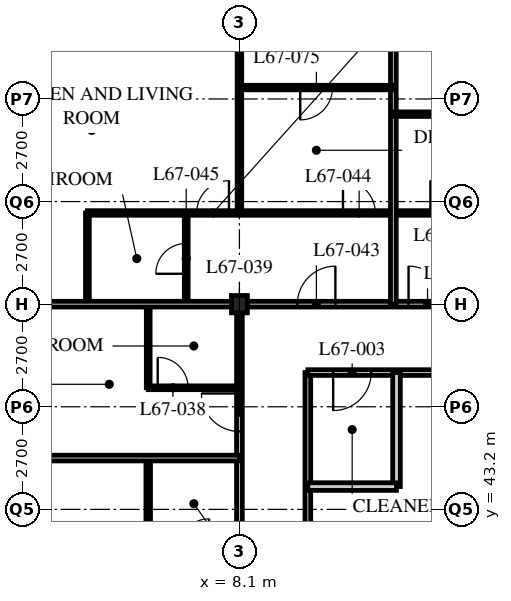
"""IFC4 building model, lengths in metres.
Left out: names, types, materials, properties, quantities, classifications, styles, units other than length and angle.
Written with IfcOpenShell. Run it as: python <this file> out.ifc"""

import sys

from ifc_helpers import new_model, si_unit, direction, frame, frame_2d, origin, origin_2d, place, context, subcontext, project, spatial, rectangle, i_section, extrude, element, fill, save


model = new_model("IFC4")
c1 = context("Model", 3, precision=1e-05, world=origin(), true_north=direction((0.0, 1.0)))
c2 = subcontext(c1, "Body", "Model", "MODEL_VIEW")
j1 = project(units=[si_unit("LENGTHUNIT", "METRE"), si_unit("PLANEANGLEUNIT", "RADIAN")], contexts=[c1])
p1 = place(None, origin())
s1 = spatial("IfcSite", under=j1, at=p1, CompositionType="ELEMENT")
p2 = place(p1, origin())
s2 = spatial("IfcBuilding", under=s1, at=p2, CompositionType="ELEMENT")
p3 = place(p2, frame((0.0, 0.0, 261.9)))
s3 = spatial("IfcBuildingStorey", under=s2, at=p3, CompositionType="ELEMENT", Elevation=261.9)
p4 = place(p3, frame((8.1, 48.6, 0.0), z_axis=(0.0, 0.0, 1.0), x_axis=(1.0, 0.0, 0.0)))
e1 = element("IfcColumn", 1, at=p4, inside=s3, PredefinedType="COLUMN", context=c2, shape_type="SweptSolid", body=[
    extrude(i_section(OverallWidth=0.418, OverallDepth=0.456, WebThickness=0.042, FlangeThickness=0.067, FilletRadius=0.015, at=origin_2d()), origin(), (0.0, 0.0, 1.0), 3.9),
])
p5 = place(p3, frame((8.1, 48.6, 0.0), z_axis=(0.0, 0.0, 1.0), x_axis=(1.0, 0.0, 0.0)))
e2 = element("IfcWall", 2, at=p5, inside=s3, PredefinedType="PARTITIONING", context=c2, shape_type="SweptSolid", body=[
    extrude(rectangle(XDim=28.35, YDim=0.15, at=frame_2d((14.175, 0.0))), origin(), (0.0, 0.0, 1.0), 3.078),
])
p6 = place(p5, frame((4.45, 0.0, 0.0)))
e3 = element("IfcOpeningElement", 3, at=p6, cuts=e2, PredefinedType="OPENING", context=c2, shape_type="SweptSolid", body=[
    extrude(rectangle(XDim=1.0, YDim=2.1, at=frame_2d((0.5, 1.05))), frame((0.0, 0.085, 0.0), z_axis=(0.0, -1.0, 0.0), x_axis=(1.0, 0.0, 0.0)), (0.0, 0.0, 1.0), 0.17),
])
p7 = place(p5, frame((20.65, 0.0, 0.0)))
e4 = element("IfcOpeningElement", 4, at=p7, cuts=e2, PredefinedType="OPENING", context=c2, shape_type="SweptSolid", body=[
    extrude(rectangle(XDim=1.0, YDim=2.1, at=frame_2d((0.5, 1.05))), frame((0.0, 0.085, 0.0), z_axis=(0.0, -1.0, 0.0), x_axis=(1.0, 0.0, 0.0)), (0.0, 0.0, 1.0), 0.17),
])
p8 = place(p5, frame((1.525, 0.0, 0.0)))
e5 = element("IfcOpeningElement", 5, at=p8, cuts=e2, PredefinedType="OPENING", context=c2, shape_type="SweptSolid", body=[
    extrude(rectangle(XDim=1.0, YDim=2.1, at=frame_2d((0.5, 1.05))), frame((0.0, 0.085, 0.0), z_axis=(0.0, -1.0, 0.0), x_axis=(1.0, 0.0, 0.0)), (0.0, 0.0, 1.0), 0.17),
])
p9 = place(p3, frame((8.1, 22.5, 0.0), z_axis=(0.0, 0.0, 1.0), x_axis=(0.0, 1.0, 0.0)))
e6 = element("IfcWall", 6, at=p9, inside=s3, PredefinedType="PARTITIONING", context=c2, shape_type="SweptSolid", body=[
    extrude(rectangle(XDim=26.1, YDim=0.15, at=frame_2d((13.05, 0.0))), origin(), (0.0, 0.0, 1.0), 3.078),
])
p10 = place(p9, frame((2.65, 0.0, 0.0)))
e7 = element("IfcOpeningElement", 7, at=p10, cuts=e6, PredefinedType="OPENING", context=c2, shape_type="SweptSolid", body=[
    extrude(rectangle(XDim=1.0, YDim=2.1, at=frame_2d((0.5, 1.05))), frame((0.0, 0.085, 0.0), z_axis=(0.0, -1.0, 0.0), x_axis=(1.0, 0.0, 0.0)), (0.0, 0.0, 1.0), 0.17),
])
p11 = place(p9, frame((22.75, 0.0, 0.0)))
e8 = element("IfcOpeningElement", 8, at=p11, cuts=e6, PredefinedType="OPENING", context=c2, shape_type="SweptSolid", body=[
    extrude(rectangle(XDim=1.0, YDim=2.1, at=frame_2d((0.5, 1.05))), frame((0.0, 0.085, 0.0), z_axis=(0.0, -1.0, 0.0), x_axis=(1.0, 0.0, 0.0)), (0.0, 0.0, 1.0), 0.17),
])
p12 = place(p3, frame((9.9, 24.3, 0.0), z_axis=(0.0, 0.0, 1.0), x_axis=(0.0, 1.0, 0.0)))
e9 = element("IfcWall", 9, at=p12, inside=s3, PredefinedType="PARTITIONING", context=c2, shape_type="SweptSolid", body=[
    extrude(rectangle(XDim=22.5, YDim=0.15, at=frame_2d((11.25, 0.0))), origin(), (0.0, 0.0, 1.0), 3.69),
])
p13 = place(p12, frame((3.55, 0.0, 0.0)))
e10 = element("IfcOpeningElement", 10, at=p13, cuts=e9, PredefinedType="OPENING", context=c2, shape_type="SweptSolid", body=[
    extrude(rectangle(XDim=1.0, YDim=2.1, at=frame_2d((0.5, 1.05))), frame((0.0, 0.085, 0.0), z_axis=(0.0, -1.0, 0.0), x_axis=(1.0, 0.0, 0.0)), (0.0, 0.0, 1.0), 0.17),
])
p14 = place(p12, frame((11.65, 0.0, 0.0)))
e11 = element("IfcOpeningElement", 11, at=p14, cuts=e9, PredefinedType="OPENING", context=c2, shape_type="SweptSolid", body=[
    extrude(rectangle(XDim=1.0, YDim=2.1, at=frame_2d((0.5, 1.05))), frame((0.0, 0.085, 0.0), z_axis=(0.0, -1.0, 0.0), x_axis=(1.0, 0.0, 0.0)), (0.0, 0.0, 1.0), 0.17),
])
p15 = place(p3, frame((9.9, 46.8, 0.0), z_axis=(0.0, 0.0, 1.0), x_axis=(1.0, 0.0, 0.0)))
e12 = element("IfcWall", 12, at=p15, inside=s3, PredefinedType="PARTITIONING", context=c2, shape_type="SweptSolid", body=[
    extrude(rectangle(XDim=17.24, YDim=0.15, at=frame_2d((8.62, 0.0))), origin(), (0.0, 0.0, 1.0), 3.69),
])
p16 = place(p15, frame((0.667, 0.0, 0.0)))
e13 = element("IfcOpeningElement", 13, at=p16, cuts=e12, PredefinedType="OPENING", context=c2, shape_type="SweptSolid", body=[
    extrude(rectangle(XDim=1.0, YDim=2.1, at=frame_2d((0.5, 1.05))), frame((0.0, 0.085, 0.0), z_axis=(0.0, -1.0, 0.0), x_axis=(1.0, 0.0, 0.0)), (0.0, 0.0, 1.0), 0.17),
])
p17 = place(p15, frame((3.817, 0.0, 0.0)))
e14 = element("IfcOpeningElement", 14, at=p17, cuts=e12, PredefinedType="OPENING", context=c2, shape_type="SweptSolid", body=[
    extrude(rectangle(XDim=1.0, YDim=2.1, at=frame_2d((0.5, 1.05))), frame((0.0, 0.085, 0.0), z_axis=(0.0, -1.0, 0.0), x_axis=(1.0, 0.0, 0.0)), (0.0, 0.0, 1.0), 0.17),
])
p18 = place(p15, frame((8.102, 0.0, 0.0)))
e15 = element("IfcOpeningElement", 15, at=p18, cuts=e12, PredefinedType="OPENING", context=c2, shape_type="SweptSolid", body=[
    extrude(rectangle(XDim=1.0, YDim=2.1, at=frame_2d((0.5, 1.05))), frame((0.0, 0.085, 0.0), z_axis=(0.0, -1.0, 0.0), x_axis=(1.0, 0.0, 0.0)), (0.0, 0.0, 1.0), 0.17),
])
p19 = place(p15, frame((13.577, 0.0, 0.0)))
e16 = element("IfcOpeningElement", 16, at=p19, cuts=e12, PredefinedType="OPENING", context=c2, shape_type="SweptSolid", body=[
    extrude(rectangle(XDim=1.0, YDim=2.1, at=frame_2d((0.5, 1.05))), frame((0.0, 0.085, 0.0), z_axis=(0.0, -1.0, 0.0), x_axis=(1.0, 0.0, 0.0)), (0.0, 0.0, 1.0), 0.17),
])
p20 = place(p3, frame((12.233, 46.8, 0.0), z_axis=(0.0, 0.0, 1.0), x_axis=(0.0, -1.0, 0.0)))
e17 = element("IfcWall", 17, at=p20, inside=s3, PredefinedType="SOLIDWALL", context=c2, shape_type="SweptSolid", body=[
    extrude(rectangle(XDim=3.0, YDim=0.2, at=frame_2d((1.5, 0.0))), origin(), (0.0, 0.0, 1.0), 3.69),
])
p21 = place(p3, frame((9.9, 43.8, 0.0), z_axis=(0.0, 0.0, 1.0), x_axis=(1.0, 0.0, 0.0)))
e18 = element("IfcWall", 18, at=p21, inside=s3, PredefinedType="SOLIDWALL", context=c2, shape_type="SweptSolid", body=[
    extrude(rectangle(XDim=2.333, YDim=0.2, at=frame_2d((1.167, 0.0))), origin(), (0.0, 0.0, 1.0), 3.69),
])
p22 = place(p3, frame((5.7, 22.5, 0.0), z_axis=(0.0, 0.0, 1.0), x_axis=(0.0, 1.0, 0.0)))
e19 = element("IfcWall", 19, at=p22, inside=s3, PredefinedType="PARTITIONING", context=c2, shape_type="SweptSolid", body=[
    extrude(rectangle(XDim=22.05, YDim=0.12, at=frame_2d((11.025, 0.0))), origin(), (0.0, 0.0, 1.0), 3.69),
])
p23 = place(p22, frame((0.975, 0.0, 0.0)))
e20 = element("IfcOpeningElement", 20, at=p23, cuts=e19, PredefinedType="OPENING", context=c2, shape_type="SweptSolid", body=[
    extrude(rectangle(XDim=0.85, YDim=2.1, at=frame_2d((0.425, 1.05))), frame((0.0, 0.07, 0.0), z_axis=(0.0, -1.0, 0.0), x_axis=(1.0, 0.0, 0.0)), (0.0, 0.0, 1.0), 0.14),
])
p24 = place(p22, frame((10.225, 0.0, 0.0)))
e21 = element("IfcOpeningElement", 21, at=p24, cuts=e19, PredefinedType="OPENING", context=c2, shape_type="SweptSolid", body=[
    extrude(rectangle(XDim=0.85, YDim=2.1, at=frame_2d((0.425, 1.05))), frame((0.0, 0.07, 0.0), z_axis=(0.0, -1.0, 0.0), x_axis=(1.0, 0.0, 0.0)), (0.0, 0.0, 1.0), 0.14),
])
p25 = place(p22, frame((14.275, 0.0, 0.0)))
e22 = element("IfcOpeningElement", 22, at=p25, cuts=e19, PredefinedType="OPENING", context=c2, shape_type="SweptSolid", body=[
    extrude(rectangle(XDim=0.85, YDim=2.1, at=frame_2d((0.425, 1.05))), frame((0.0, 0.07, 0.0), z_axis=(0.0, -1.0, 0.0), x_axis=(1.0, 0.0, 0.0)), (0.0, 0.0, 1.0), 0.14),
])
p26 = place(p22, frame((18.325, 0.0, 0.0)))
e23 = element("IfcOpeningElement", 23, at=p26, cuts=e19, PredefinedType="OPENING", context=c2, shape_type="SweptSolid", body=[
    extrude(rectangle(XDim=0.85, YDim=2.1, at=frame_2d((0.425, 1.05))), frame((0.0, 0.07, 0.0), z_axis=(0.0, -1.0, 0.0), x_axis=(1.0, 0.0, 0.0)), (0.0, 0.0, 1.0), 0.14),
])
p27 = place(p3, frame((8.1, 44.55, 0.0), z_axis=(0.0, 0.0, 1.0), x_axis=(-1.0, 0.0, 0.0)))
e24 = element("IfcWall", 24, at=p27, inside=s3, PredefinedType="PARTITIONING", context=c2, shape_type="SweptSolid", body=[
    extrude(rectangle(XDim=7.8, YDim=0.15, at=frame_2d((3.9, 0.0))), origin(), (0.0, 0.0, 1.0), 3.69),
])
p28 = place(p3, frame((5.7, 46.4, 0.0), z_axis=(0.0, 0.0, 1.0), x_axis=(0.0, 1.0, 0.0)))
e25 = element("IfcWall", 25, at=p28, inside=s3, PredefinedType="PARTITIONING", context=c2, shape_type="SweptSolid", body=[
    extrude(rectangle(XDim=2.2, YDim=0.1, at=frame_2d((1.1, 0.0))), origin(), (0.0, 0.0, 1.0), 3.69),
])
p29 = place(p3, frame((8.1, 46.4, 0.0), z_axis=(0.0, 0.0, 1.0), x_axis=(-1.0, 0.0, 0.0)))
e26 = element("IfcWall", 26, at=p29, inside=s3, PredefinedType="PARTITIONING", context=c2, shape_type="SweptSolid", body=[
    extrude(rectangle(XDim=2.4, YDim=0.1, at=frame_2d((1.2, 0.0))), origin(), (0.0, 0.0, 1.0), 3.69),
])
p30 = place(p29, frame((1.35, 0.0, 0.0)))
e27 = element("IfcOpeningElement", 27, at=p30, cuts=e26, PredefinedType="OPENING", context=c2, shape_type="SweptSolid", body=[
    extrude(rectangle(XDim=0.8, YDim=2.1, at=frame_2d((0.4, 1.05))), frame((0.0, 0.06, 0.0), z_axis=(0.0, -1.0, 0.0), x_axis=(1.0, 0.0, 0.0)), (0.0, 0.0, 1.0), 0.12),
])
p31 = place(p3, frame((6.7, 48.6, 0.0), z_axis=(0.0, 0.0, 1.0), x_axis=(0.0, 1.0, 0.0)))
e28 = element("IfcWall", 28, at=p31, inside=s3, PredefinedType="PARTITIONING", context=c2, shape_type="SweptSolid", body=[
    extrude(rectangle(XDim=2.4, YDim=0.1, at=frame_2d((1.2, 0.0))), origin(), (0.0, 0.0, 1.0), 3.69),
])
p32 = place(p31, frame((0.8, 0.0, 0.0)))
e29 = element("IfcOpeningElement", 29, at=p32, cuts=e28, PredefinedType="OPENING", context=c2, shape_type="SweptSolid", body=[
    extrude(rectangle(XDim=0.8, YDim=2.1, at=frame_2d((0.4, 1.05))), frame((0.0, 0.06, 0.0), z_axis=(0.0, -1.0, 0.0), x_axis=(1.0, 0.0, 0.0)), (0.0, 0.0, 1.0), 0.12),
])
p33 = place(p3, frame((4.1, 48.6, 0.0), z_axis=(0.0, 0.0, 1.0), x_axis=(0.0, 1.0, 0.0)))
e30 = element("IfcWall", 30, at=p33, inside=s3, PredefinedType="PARTITIONING", context=c2, shape_type="SweptSolid", body=[
    extrude(rectangle(XDim=2.4, YDim=0.1, at=frame_2d((1.2, 0.0))), origin(), (0.0, 0.0, 1.0), 3.69),
])
p34 = place(p3, frame((4.1, 51.0, 0.0), z_axis=(0.0, 0.0, 1.0), x_axis=(1.0, 0.0, 0.0)))
e31 = element("IfcWall", 31, at=p34, inside=s3, PredefinedType="PARTITIONING", context=c2, shape_type="SweptSolid", body=[
    extrude(rectangle(XDim=32.35, YDim=0.12, at=frame_2d((16.175, 0.0))), origin(), (0.0, 0.0, 1.0), 3.69),
])
p35 = place(p34, frame((9.025, 0.0, 0.0)))
e32 = element("IfcOpeningElement", 32, at=p35, cuts=e31, PredefinedType="OPENING", context=c2, shape_type="SweptSolid", body=[
    extrude(rectangle(XDim=0.85, YDim=2.1, at=frame_2d((0.425, 1.05))), frame((0.0, 0.07, 0.0), z_axis=(0.0, -1.0, 0.0), x_axis=(1.0, 0.0, 0.0)), (0.0, 0.0, 1.0), 0.14),
])
p36 = place(p34, frame((16.475, 0.0, 0.0)))
e33 = element("IfcOpeningElement", 33, at=p36, cuts=e31, PredefinedType="OPENING", context=c2, shape_type="SweptSolid", body=[
    extrude(rectangle(XDim=0.85, YDim=2.1, at=frame_2d((0.425, 1.05))), frame((0.0, 0.07, 0.0), z_axis=(0.0, -1.0, 0.0), x_axis=(1.0, 0.0, 0.0)), (0.0, 0.0, 1.0), 0.14),
])
p37 = place(p34, frame((20.525, 0.0, 0.0)))
e34 = element("IfcOpeningElement", 34, at=p37, cuts=e31, PredefinedType="OPENING", context=c2, shape_type="SweptSolid", body=[
    extrude(rectangle(XDim=0.85, YDim=2.1, at=frame_2d((0.425, 1.05))), frame((0.0, 0.07, 0.0), z_axis=(0.0, -1.0, 0.0), x_axis=(1.0, 0.0, 0.0)), (0.0, 0.0, 1.0), 0.14),
])
p38 = place(p34, frame((25.225, 0.0, 0.0)))
e35 = element("IfcOpeningElement", 35, at=p38, cuts=e31, PredefinedType="OPENING", context=c2, shape_type="SweptSolid", body=[
    extrude(rectangle(XDim=0.85, YDim=2.1, at=frame_2d((0.425, 1.05))), frame((0.0, 0.07, 0.0), z_axis=(0.0, -1.0, 0.0), x_axis=(1.0, 0.0, 0.0)), (0.0, 0.0, 1.0), 0.14),
])
p39 = place(p34, frame((28.625, 0.0, 0.0)))
e36 = element("IfcOpeningElement", 36, at=p39, cuts=e31, PredefinedType="OPENING", context=c2, shape_type="SweptSolid", body=[
    extrude(rectangle(XDim=0.85, YDim=2.1, at=frame_2d((0.425, 1.05))), frame((0.0, 0.07, 0.0), z_axis=(0.0, -1.0, 0.0), x_axis=(1.0, 0.0, 0.0)), (0.0, 0.0, 1.0), 0.14),
])
p40 = place(p34, frame((6.725, 0.0, 0.0)))
e37 = element("IfcOpeningElement", 37, at=p40, cuts=e31, PredefinedType="OPENING", context=c2, shape_type="SweptSolid", body=[
    extrude(rectangle(XDim=0.85, YDim=2.1, at=frame_2d((0.425, 1.05))), frame((0.0, 0.07, 0.0), z_axis=(0.0, -1.0, 0.0), x_axis=(1.0, 0.0, 0.0)), (0.0, 0.0, 1.0), 0.14),
])
p41 = place(p34, frame((2.875, 0.0, 0.0)))
e38 = element("IfcOpeningElement", 38, at=p41, cuts=e31, PredefinedType="OPENING", context=c2, shape_type="SweptSolid", body=[
    extrude(rectangle(XDim=0.85, YDim=2.1, at=frame_2d((0.425, 1.05))), frame((0.0, 0.07, 0.0), z_axis=(0.0, -1.0, 0.0), x_axis=(1.0, 0.0, 0.0)), (0.0, 0.0, 1.0), 0.14),
])
p42 = place(p3, frame((8.1, 51.0, 0.0), z_axis=(0.0, 0.0, 1.0), x_axis=(0.0, 1.0, 0.0)))
e39 = element("IfcWall", 39, at=p42, inside=s3, PredefinedType="PARTITIONING", context=c2, shape_type="SweptSolid", body=[
    extrude(rectangle(XDim=9.45, YDim=0.12, at=frame_2d((4.725, 0.0))), origin(), (0.0, 0.0, 1.0), 3.078),
])
p43 = place(p3, frame((0.3, 48.6, 0.0), z_axis=(0.0, 0.0, 1.0), x_axis=(1.0, 0.0, 0.0)))
e40 = element("IfcWall", 40, at=p43, inside=s3, PredefinedType="PARTITIONING", context=c2, shape_type="SweptSolid", body=[
    extrude(rectangle(XDim=7.8, YDim=0.15, at=frame_2d((3.9, 0.0))), origin(), (0.0, 0.0, 1.0), 3.078),
])
p44 = place(p3, frame((12.15, 48.6, 0.0), z_axis=(0.0, 0.0, 1.0), x_axis=(0.0, 1.0, 0.0)))
e41 = element("IfcWall", 41, at=p44, inside=s3, PredefinedType="PARTITIONING", context=c2, shape_type="SweptSolid", body=[
    extrude(rectangle(XDim=15.9, YDim=0.15, at=frame_2d((7.95, 0.0))), origin(), (0.0, 0.0, 1.0), 3.69),
])
p45 = place(p3, frame((12.15, 53.6, 0.0), z_axis=(0.0, 0.0, 1.0), x_axis=(1.0, 0.0, 0.0)))
e42 = element("IfcWall", 42, at=p45, inside=s3, PredefinedType="PARTITIONING", context=c2, shape_type="SweptSolid", body=[
    extrude(rectangle(XDim=8.1, YDim=0.12, at=frame_2d((4.05, 0.0))), origin(), (0.0, 0.0, 1.0), 3.69),
])
p46 = place(p45, frame((1.675, 0.0, 0.0)))
e43 = element("IfcOpeningElement", 43, at=p46, cuts=e42, PredefinedType="OPENING", context=c2, shape_type="SweptSolid", body=[
    extrude(rectangle(XDim=0.85, YDim=2.1, at=frame_2d((0.425, 1.05))), frame((0.0, 0.07, 0.0), z_axis=(0.0, -1.0, 0.0), x_axis=(1.0, 0.0, 0.0)), (0.0, 0.0, 1.0), 0.14),
])
p47 = place(p3, frame((8.1, 54.3, 0.0), z_axis=(0.0, 0.0, 1.0), x_axis=(1.0, 0.0, 0.0)))
e44 = element("IfcWall", 44, at=p47, inside=s3, PredefinedType="PARTITIONING", context=c2, shape_type="SweptSolid", body=[
    extrude(rectangle(XDim=4.05, YDim=0.12, at=frame_2d((2.025, 0.0))), origin(), (0.0, 0.0, 1.0), 3.69),
])
p48 = place(p47, frame((1.6, 0.0, 0.0)))
e45 = element("IfcOpeningElement", 45, at=p48, cuts=e44, PredefinedType="OPENING", context=c2, shape_type="SweptSolid", body=[
    extrude(rectangle(XDim=0.85, YDim=2.1, at=frame_2d((0.425, 1.05))), frame((0.0, 0.07, 0.0), z_axis=(0.0, -1.0, 0.0), x_axis=(1.0, 0.0, 0.0)), (0.0, 0.0, 1.0), 0.14),
])
p49 = place(p16, origin())
e46 = element("IfcDoor", 46, at=p49, inside=s3, OperationType="SINGLE_SWING_RIGHT", PredefinedType="DOOR", context=c2, shape_type="SweptSolid", body=[
    extrude(rectangle(XDim=1.0, YDim=2.1, at=frame_2d((0.5, 1.05))), frame((0.0, 0.025, 0.0), z_axis=(0.0, -1.0, 0.0), x_axis=(1.0, 0.0, 0.0)), (0.0, 0.0, 1.0), 0.05),
])
fill(e13, e46)
p50 = place(p6, origin())
e47 = element("IfcDoor", 47, at=p50, inside=s3, OperationType="SINGLE_SWING_LEFT", PredefinedType="DOOR", context=c2, shape_type="SweptSolid", body=[
    extrude(rectangle(XDim=1.0, YDim=2.1, at=frame_2d((0.5, 1.05))), frame((0.0, 0.025, 0.0), z_axis=(0.0, -1.0, 0.0), x_axis=(1.0, 0.0, 0.0)), (0.0, 0.0, 1.0), 0.05),
])
fill(e3, e47)
p51 = place(p35, origin())
e48 = element("IfcDoor", 48, at=p51, inside=s3, OperationType="SINGLE_SWING_LEFT", PredefinedType="DOOR", context=c2, shape_type="SweptSolid", body=[
    extrude(rectangle(XDim=0.85, YDim=2.1, at=frame_2d((0.425, 1.05))), frame((0.0, 0.025, 0.0), z_axis=(0.0, -1.0, 0.0), x_axis=(1.0, 0.0, 0.0)), (0.0, 0.0, 1.0), 0.05),
])
fill(e32, e48)
p52 = place(p30, origin())
e49 = element("IfcDoor", 49, at=p52, inside=s3, OperationType="SINGLE_SWING_LEFT", PredefinedType="DOOR", context=c2, shape_type="SweptSolid", body=[
    extrude(rectangle(XDim=0.8, YDim=2.1, at=frame_2d((0.4, 1.05))), frame((0.0, 0.025, 0.0), z_axis=(0.0, -1.0, 0.0), x_axis=(1.0, 0.0, 0.0)), (0.0, 0.0, 1.0), 0.05),
])
fill(e27, e49)
p53 = place(p11, origin())
e50 = element("IfcDoor", 50, at=p53, inside=s3, OperationType="SINGLE_SWING_RIGHT", PredefinedType="DOOR", context=c2, shape_type="SweptSolid", body=[
    extrude(rectangle(XDim=1.0, YDim=2.1, at=frame_2d((0.5, 1.05))), frame((0.0, 0.025, 0.0), z_axis=(0.0, -1.0, 0.0), x_axis=(1.0, 0.0, 0.0)), (0.0, 0.0, 1.0), 0.05),
])
fill(e8, e50)
p54 = place(p8, origin())
e51 = element("IfcDoor", 51, at=p54, inside=s3, OperationType="SINGLE_SWING_RIGHT", PredefinedType="DOOR", context=c2, shape_type="SweptSolid", body=[
    extrude(rectangle(XDim=1.0, YDim=2.1, at=frame_2d((0.5, 1.05))), frame((0.0, 0.025, 0.0), z_axis=(0.0, -1.0, 0.0), x_axis=(1.0, 0.0, 0.0)), (0.0, 0.0, 1.0), 0.05),
])
fill(e5, e51)
p55 = place(p40, origin())
e52 = element("IfcDoor", 52, at=p55, inside=s3, OperationType="SINGLE_SWING_LEFT", PredefinedType="DOOR", context=c2, shape_type="SweptSolid", body=[
    extrude(rectangle(XDim=0.85, YDim=2.1, at=frame_2d((0.425, 1.05))), frame((0.0, 0.025, 0.0), z_axis=(0.0, -1.0, 0.0), x_axis=(1.0, 0.0, 0.0)), (0.0, 0.0, 1.0), 0.05),
])
fill(e37, e52)
p56 = place(p32, origin())
e53 = element("IfcDoor", 53, at=p56, inside=s3, OperationType="SINGLE_SWING_LEFT", PredefinedType="DOOR", context=c2, shape_type="SweptSolid", body=[
    extrude(rectangle(XDim=0.8, YDim=2.1, at=frame_2d((0.4, 1.05))), frame((0.0, 0.025, 0.0), z_axis=(0.0, -1.0, 0.0), x_axis=(1.0, 0.0, 0.0)), (0.0, 0.0, 1.0), 0.05),
])
fill(e29, e53)
p57 = place(p41, origin())
e54 = element("IfcDoor", 54, at=p57, inside=s3, OperationType="SINGLE_SWING_RIGHT", PredefinedType="DOOR", context=c2, shape_type="SweptSolid", body=[
    extrude(rectangle(XDim=0.85, YDim=2.1, at=frame_2d((0.425, 1.05))), frame((0.0, 0.025, 0.0), z_axis=(0.0, -1.0, 0.0), x_axis=(1.0, 0.0, 0.0)), (0.0, 0.0, 1.0), 0.05),
])
fill(e38, e54)
p58 = place(p48, origin())
e55 = element("IfcDoor", 55, at=p58, inside=s3, OperationType="SINGLE_SWING_RIGHT", PredefinedType="DOOR", context=c2, shape_type="SweptSolid", body=[
    extrude(rectangle(XDim=0.85, YDim=2.1, at=frame_2d((0.425, 1.05))), frame((0.0, 0.025, 0.0), z_axis=(0.0, -1.0, 0.0), x_axis=(1.0, 0.0, 0.0)), (0.0, 0.0, 1.0), 0.05),
])
fill(e45, e55)
save(model, sys.argv[1])
